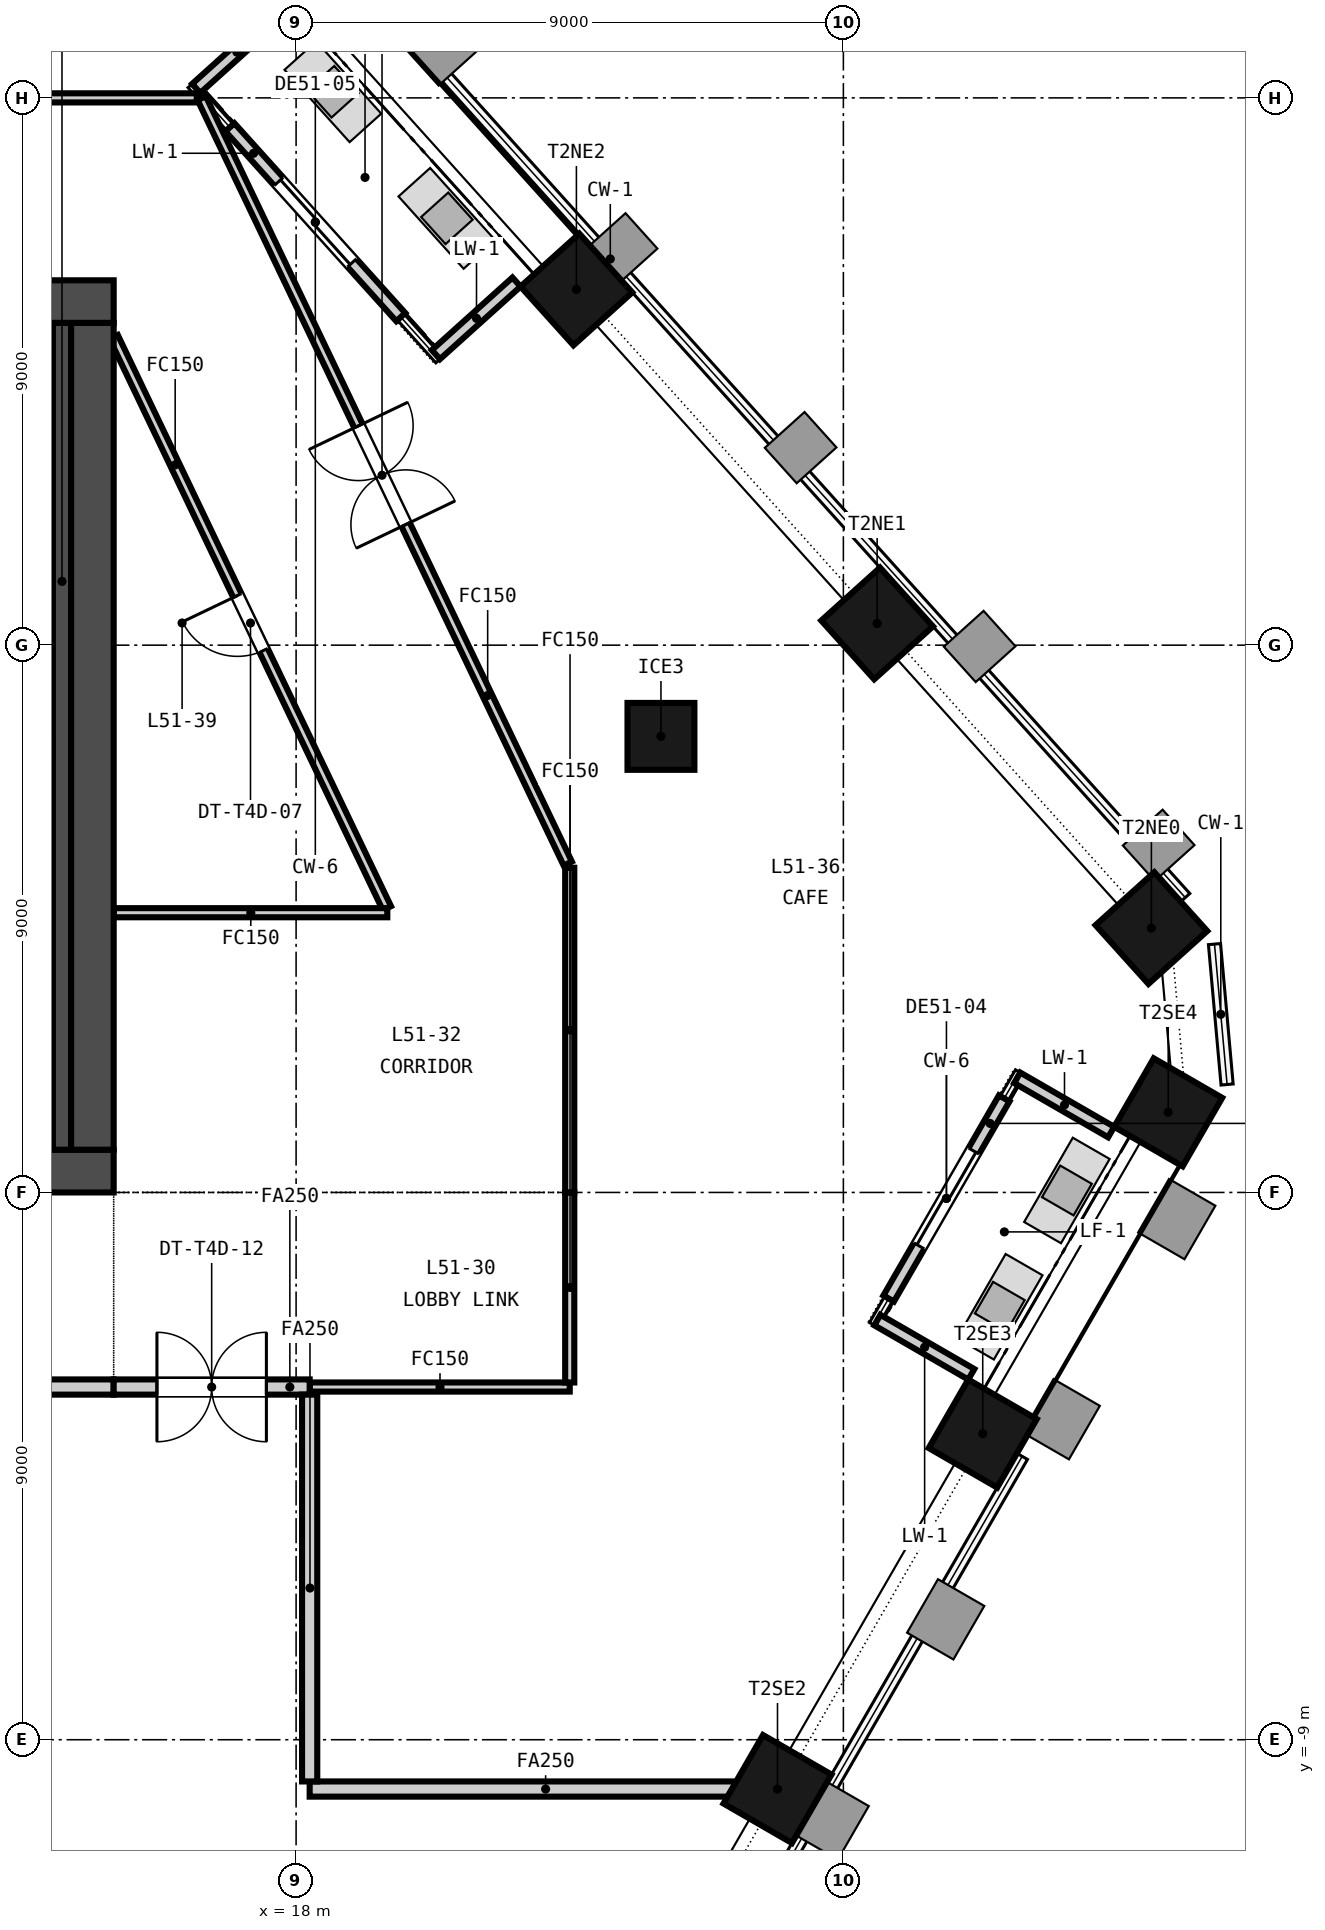
"""IFC4 building model, lengths in metres.
Left out: names, types, materials, properties, quantities, classifications, styles, units other than length and angle.
Written with IfcOpenShell. Run it as: python <this file> out.ifc"""

import sys

from ifc_helpers import new_model, si_unit, direction, frame, frame_2d, origin, origin_2d, place, context, subcontext, project, spatial, rectangle, extrude, element, fill, save


model = new_model("IFC4")
c1 = context("Model", 3, precision=1e-05, world=origin(), true_north=direction((0.0, 1.0)))
c2 = subcontext(c1, "Body", "Model", "MODEL_VIEW")
j1 = project(units=[si_unit("LENGTHUNIT", "METRE"), si_unit("PLANEANGLEUNIT", "RADIAN")], contexts=[c1])
p1 = place(None, origin())
s1 = spatial("IfcSite", under=j1, at=p1, CompositionType="ELEMENT")
p2 = place(p1, origin())
s2 = spatial("IfcBuilding", under=s1, at=p2, CompositionType="ELEMENT")
p3 = place(p2, frame((0.0, 0.0, 203.65)))
s3 = spatial("IfcBuildingStorey", under=s2, at=p3, CompositionType="ELEMENT", Elevation=203.65)
p4 = place(p3, frame((-15.0, 0.35, -0.15), z_axis=(0.0, 0.0, 1.0), x_axis=(1.0, 0.0, 0.0)))
e1 = element("IfcWall", 1, at=p4, inside=s3, PredefinedType="SOLIDWALL", context=c2, shape_type="SweptSolid", body=[
    extrude(rectangle(XDim=30.0, YDim=0.7, at=frame_2d((15.0, 0.0))), origin(), (0.0, 0.0, 1.0), 3.5),
])
p5 = place(p4, frame((5.8, 0.0, 0.15)))
e2 = element("IfcOpeningElement", 2, at=p5, cuts=e1, PredefinedType="OPENING", context=c2, shape_type="SweptSolid", body=[
    extrude(rectangle(XDim=2.4, YDim=2.4, at=frame_2d((1.2, 1.2))), frame((0.0, 0.36, 0.0), z_axis=(0.0, -1.0, 0.0), x_axis=(1.0, 0.0, 0.0)), (0.0, 0.0, 1.0), 0.72),
])
p6 = place(p4, frame((13.8, 0.0, 0.15)))
e3 = element("IfcOpeningElement", 3, at=p6, cuts=e1, PredefinedType="OPENING", context=c2, shape_type="SweptSolid", body=[
    extrude(rectangle(XDim=2.4, YDim=2.4, at=frame_2d((1.2, 1.2))), frame((0.0, 0.36, 0.0), z_axis=(0.0, -1.0, 0.0), x_axis=(1.0, 0.0, 0.0)), (0.0, 0.0, 1.0), 0.72),
])
p7 = place(p4, frame((21.8, 0.0, 0.15)))
e4 = element("IfcOpeningElement", 4, at=p7, cuts=e1, PredefinedType="OPENING", context=c2, shape_type="SweptSolid", body=[
    extrude(rectangle(XDim=2.4, YDim=2.4, at=frame_2d((1.2, 1.2))), frame((0.0, 0.36, 0.0), z_axis=(0.0, -1.0, 0.0), x_axis=(1.0, 0.0, 0.0)), (0.0, 0.0, 1.0), 0.72),
])
p8 = place(p4, frame((1.5, 0.0, 0.15)))
e5 = element("IfcOpeningElement", 5, at=p8, cuts=e1, PredefinedType="OPENING", context=c2, shape_type="SweptSolid", body=[
    extrude(rectangle(XDim=1.2, YDim=2.1, at=frame_2d((0.6, 1.05))), frame((0.0, 0.36, 0.0), z_axis=(0.0, -1.0, 0.0), x_axis=(1.0, 0.0, 0.0)), (0.0, 0.0, 1.0), 0.72),
])
p9 = place(p4, frame((27.3, 0.0, 0.15)))
e6 = element("IfcOpeningElement", 6, at=p9, cuts=e1, PredefinedType="OPENING", context=c2, shape_type="SweptSolid", body=[
    extrude(rectangle(XDim=1.2, YDim=2.1, at=frame_2d((0.6, 1.05))), frame((0.0, 0.36, 0.0), z_axis=(0.0, -1.0, 0.0), x_axis=(1.0, 0.0, 0.0)), (0.0, 0.0, 1.0), 0.72),
])
p10 = place(p3, frame((-15.0, 14.65, -0.15), z_axis=(0.0, 0.0, 1.0), x_axis=(1.0, 0.0, 0.0)))
e7 = element("IfcWall", 7, at=p10, inside=s3, PredefinedType="SOLIDWALL", context=c2, shape_type="SweptSolid", body=[
    extrude(rectangle(XDim=30.0, YDim=0.7, at=frame_2d((15.0, 0.0))), origin(), (0.0, 0.0, 1.0), 3.5),
])
p11 = place(p10, frame((9.25, 0.0, 0.15)))
e8 = element("IfcOpeningElement", 8, at=p11, cuts=e7, PredefinedType="OPENING", context=c2, shape_type="SweptSolid", body=[
    extrude(rectangle(XDim=1.5, YDim=2.1, at=frame_2d((0.75, 1.05))), frame((0.0, 0.36, 0.0), z_axis=(0.0, -1.0, 0.0), x_axis=(1.0, 0.0, 0.0)), (0.0, 0.0, 1.0), 0.72),
])
p12 = place(p10, frame((19.4, 0.0, 0.15)))
e9 = element("IfcOpeningElement", 9, at=p12, cuts=e7, PredefinedType="OPENING", context=c2, shape_type="SweptSolid", body=[
    extrude(rectangle(XDim=1.5, YDim=2.1, at=frame_2d((0.75, 1.05))), frame((0.0, 0.36, 0.0), z_axis=(0.0, -1.0, 0.0), x_axis=(1.0, 0.0, 0.0)), (0.0, 0.0, 1.0), 0.72),
])
p13 = place(p10, frame((1.5, 0.0, 0.15)))
e10 = element("IfcOpeningElement", 10, at=p13, cuts=e7, PredefinedType="OPENING", context=c2, shape_type="SweptSolid", body=[
    extrude(rectangle(XDim=1.2, YDim=2.1, at=frame_2d((0.6, 1.05))), frame((0.0, 0.36, 0.0), z_axis=(0.0, -1.0, 0.0), x_axis=(1.0, 0.0, 0.0)), (0.0, 0.0, 1.0), 0.72),
])
p14 = place(p10, frame((27.3, 0.0, 0.15)))
e11 = element("IfcOpeningElement", 11, at=p14, cuts=e7, PredefinedType="OPENING", context=c2, shape_type="SweptSolid", body=[
    extrude(rectangle(XDim=1.2, YDim=2.1, at=frame_2d((0.6, 1.05))), frame((0.0, 0.36, 0.0), z_axis=(0.0, -1.0, 0.0), x_axis=(1.0, 0.0, 0.0)), (0.0, 0.0, 1.0), 0.72),
])
p15 = place(p3, frame((14.65, 0.7, -0.15), z_axis=(0.0, 0.0, 1.0), x_axis=(0.0, 1.0, 0.0)))
e12 = element("IfcWall", 12, at=p15, inside=s3, PredefinedType="SOLIDWALL", context=c2, shape_type="SweptSolid", body=[
    extrude(rectangle(XDim=13.6, YDim=0.7, at=frame_2d((6.8, 0.0))), origin(), (0.0, 0.0, 1.0), 3.5),
])
for number, where, z_axis, x_axis in (
    (13, (25.917, -9.811, -0.15), (0.0, 0.0, 1.0), (0.5, 0.866, 0.0)),
    (14, (29.292, -3.965, -0.15), (0.0, 0.0, 1.0), (0.5, 0.866, 0.0)),
    (15, (32.342, 1.318, -0.15), (0.0, 0.0, 1.0), (0.5, 0.866, 0.0)),
    (16, (32.065, 4.347, -0.15), (0.0, 0.0, 1.0), (-0.669, 0.743, 0.0)),
    (17, (27.555, 9.357, -0.15), (0.0, 0.0, 1.0), (-0.669, 0.743, 0.0)),
    (18, (22.61, 14.849, -0.15), (0.0, 0.0, 1.0), (-0.669, 0.743, 0.0)),
):
    element("IfcColumn", number, at=place(p3, frame(where, z_axis=z_axis, x_axis=x_axis)), inside=s3, PredefinedType="COLUMN", context=c2, shape_type="SweptSolid", body=[
        extrude(rectangle(XDim=1.3, YDim=1.3, at=origin_2d()), origin(), (0.0, 0.0, 1.0), 3.5),
    ])
p16 = place(p3, frame((24.0, 7.5, -0.15), z_axis=(0.0, 0.0, 1.0), x_axis=(1.0, 0.0, 0.0)))
e19 = element("IfcColumn", 19, at=p16, inside=s3, PredefinedType="COLUMN", context=c2, shape_type="SweptSolid", body=[
    extrude(rectangle(XDim=1.1, YDim=1.1, at=origin_2d()), origin(), (0.0, 0.0, 1.0), 3.5),
])
p17 = place(p3, frame((27.745, -1.744, 0.0), z_axis=(0.0, 0.0, 1.0), x_axis=(0.500015340139, 0.86601654697, 0.0)))
e20 = element("IfcWall", 20, at=p17, inside=s3, PredefinedType="SOLIDWALL", context=c2, shape_type="SweptSolid", body=[
    extrude(rectangle(XDim=3.8, YDim=0.2, at=frame_2d((1.9, 0.0))), origin(), (0.0, 0.0, 1.0), 2.75),
])
p18 = place(p17, frame((1.0, 0.0, 0.0)))
e21 = element("IfcOpeningElement", 21, at=p18, cuts=e20, PredefinedType="OPENING", context=c2, shape_type="SweptSolid", body=[
    extrude(rectangle(XDim=1.8, YDim=2.4, at=frame_2d((0.9, 1.2))), frame((0.0, 0.11, 0.0), z_axis=(0.0, -1.0, 0.0), x_axis=(1.0, 0.0, 0.0)), (0.0, 0.0, 1.0), 0.22),
])
for number, where, z_axis, x_axis in (
    (22, (29.104, -2.991, 0.0), (0.0, 0.0, 1.0), (-0.866, 0.5, 0.0)),
    (23, (31.404, 0.993, 0.0), (0.0, 0.0, 1.0), (-0.866, 0.5, 0.0)),
):
    element("IfcWall", number, at=place(p3, frame(where, z_axis=z_axis, x_axis=x_axis)), inside=s3, PredefinedType="SOLIDWALL", context=c2, shape_type="SweptSolid", body=[
        extrude(rectangle(XDim=1.784, YDim=0.2, at=frame_2d((0.892, 0.0))), origin(), (0.0, 0.0, 1.0), 2.9),
    ])
p19 = place(p3, frame((19.721, 14.395, 0.0), z_axis=(0.0, 0.0, 1.0), x_axis=(-0.669170241733, 0.743109135712, 0.0)))
e24 = element("IfcWall", 24, at=p19, inside=s3, PredefinedType="SOLIDWALL", context=c2, shape_type="SweptSolid", body=[
    extrude(rectangle(XDim=4.2, YDim=0.2, at=frame_2d((2.1, 0.0))), origin(), (0.0, 0.0, 1.0), 2.747),
])
p20 = place(p19, frame((1.2, 0.0, 0.0)))
e25 = element("IfcOpeningElement", 25, at=p20, cuts=e24, PredefinedType="OPENING", context=c2, shape_type="SweptSolid", body=[
    extrude(rectangle(XDim=1.8, YDim=2.4, at=frame_2d((0.9, 1.2))), frame((0.0, 0.11, 0.0), z_axis=(0.0, -1.0, 0.0), x_axis=(1.0, 0.0, 0.0)), (0.0, 0.0, 1.0), 0.22),
])
p21 = place(p3, frame((21.625, 14.971, 0.0), z_axis=(0.0, 0.0, 1.0), x_axis=(-0.743219291252, -0.669047894482, 0.0)))
e26 = element("IfcWall", 26, at=p21, inside=s3, PredefinedType="SOLIDWALL", context=c2, shape_type="SweptSolid", body=[
    extrude(rectangle(XDim=1.784, YDim=0.2, at=frame_2d((0.892, 0.0))), origin(), (0.0, 0.0, 1.0), 2.747),
])
p22 = place(p3, frame((17.683, 19.349, 0.0), z_axis=(0.0, 0.0, 1.0), x_axis=(-0.743158025489, -0.66911594597, 0.0)))
e27 = element("IfcWall", 27, at=p22, inside=s3, PredefinedType="SOLIDWALL", context=c2, shape_type="SweptSolid", body=[
    extrude(rectangle(XDim=1.784, YDim=0.2, at=frame_2d((0.892, 0.0))), origin(), (0.0, 0.0, 1.0), 2.9),
])
p23 = place(p3, frame((11.05, 7.35, 0.0), z_axis=(0.0, 0.0, 1.0), x_axis=(1.0, 0.0, 0.0)))
e28 = element("IfcWall", 28, at=p23, inside=s3, PredefinedType="SOLIDWALL", context=c2, shape_type="SweptSolid", body=[
    extrude(rectangle(XDim=2.95, YDim=0.3, at=frame_2d((1.475, 0.0))), origin(), (0.0, 0.0, 1.0), 3.35),
])
p24 = place(p3, frame((14.15, 0.7, 0.0), z_axis=(0.0, 0.0, 1.0), x_axis=(0.0, 1.0, 0.0)))
e29 = element("IfcWall", 29, at=p24, inside=s3, PredefinedType="SOLIDWALL", context=c2, shape_type="SweptSolid", body=[
    extrude(rectangle(XDim=13.6, YDim=0.3, at=frame_2d((6.8, 0.0))), origin(), (0.0, 0.0, 1.0), 3.35),
])
p25 = place(p3, frame((15.0, -3.2, 0.0), z_axis=(0.0, 0.0, 1.0), x_axis=(-1.0, 0.0, 0.0)))
e30 = element("IfcWall", 30, at=p25, inside=s3, PredefinedType="PARTITIONING", context=c2, shape_type="SweptSolid", body=[
    extrude(rectangle(XDim=7.355, YDim=0.25, at=frame_2d((3.677, 0.0))), origin(), (0.0, 0.0, 1.0), 2.591),
])
p26 = place(p25, frame((2.778, 0.0, 0.0)))
e31 = element("IfcOpeningElement", 31, at=p26, cuts=e30, PredefinedType="OPENING", context=c2, shape_type="SweptSolid", body=[
    extrude(rectangle(XDim=1.8, YDim=2.1, at=frame_2d((0.9, 1.05))), frame((0.0, 0.135, 0.0), z_axis=(0.0, -1.0, 0.0), x_axis=(1.0, 0.0, 0.0)), (0.0, 0.0, 1.0), 0.27),
])
p27 = place(p3, frame((22.5, -3.2, 0.0), z_axis=(0.0, 0.0, 1.0), x_axis=(-1.0, 0.0, 0.0)))
e32 = element("IfcWall", 32, at=p27, inside=s3, PredefinedType="PARTITIONING", context=c2, shape_type="SweptSolid", body=[
    extrude(rectangle(XDim=4.277, YDim=0.15, at=frame_2d((2.139, 0.0))), origin(), (0.0, 0.0, 1.0), 2.591),
])
p28 = place(p3, frame((22.5, 0.0, 0.0), z_axis=(0.0, 0.0, 1.0), x_axis=(0.0, -1.0, 0.0)))
e33 = element("IfcWall", 33, at=p28, inside=s3, PredefinedType="PARTITIONING", context=c2, shape_type="SweptSolid", body=[
    extrude(rectangle(XDim=3.125, YDim=0.15, at=frame_2d((1.562, 0.0))), origin(), (0.0, 0.0, 1.0), 2.591),
])
p29 = place(p3, frame((18.223, -3.2, 0.0), z_axis=(0.0, 0.0, 1.0), x_axis=(-1.0, 0.0, 0.0)))
e34 = element("IfcWall", 34, at=p29, inside=s3, PredefinedType="PARTITIONING", context=c2, shape_type="SweptSolid", body=[
    extrude(rectangle(XDim=3.223, YDim=0.25, at=frame_2d((1.611, 0.0))), origin(), (0.0, 0.0, 1.0), 2.591),
])
p30 = place(p29, frame((0.711, 0.0, 0.0)))
e35 = element("IfcOpeningElement", 35, at=p30, cuts=e34, PredefinedType="OPENING", context=c2, shape_type="SweptSolid", body=[
    extrude(rectangle(XDim=1.8, YDim=2.1, at=frame_2d((0.9, 1.05))), frame((0.0, 0.135, 0.0), z_axis=(0.0, -1.0, 0.0), x_axis=(1.0, 0.0, 0.0)), (0.0, 0.0, 1.0), 0.27),
])
p31 = place(p3, frame((22.5, 5.34, 0.0), z_axis=(0.0, 0.0, 1.0), x_axis=(0.0, -1.0, 0.0)))
e36 = element("IfcWall", 36, at=p31, inside=s3, PredefinedType="PARTITIONING", context=c2, shape_type="SweptSolid", body=[
    extrude(rectangle(XDim=5.34, YDim=0.15, at=frame_2d((2.67, 0.0))), origin(), (0.0, 0.0, 1.0), 2.591),
])
p32 = place(p3, frame((19.493, 4.675, 0.0), z_axis=(0.0, 0.0, 1.0), x_axis=(-0.43146462293, 0.902129857149, 0.0)))
e37 = element("IfcWall", 37, at=p32, inside=s3, PredefinedType="PARTITIONING", context=c2, shape_type="SweptSolid", body=[
    extrude(rectangle(XDim=10.413, YDim=0.15, at=frame_2d((5.207, 0.0))), origin(), (0.0, 0.0, 1.0), 2.591),
])
p33 = place(p32, frame((4.698, 0.0, 0.0)))
e38 = element("IfcOpeningElement", 38, at=p33, cuts=e37, PredefinedType="OPENING", context=c2, shape_type="SweptSolid", body=[
    extrude(rectangle(XDim=1.0, YDim=2.1, at=frame_2d((0.5, 1.05))), frame((0.0, 0.085, 0.0), z_axis=(0.0, -1.0, 0.0), x_axis=(1.0, 0.0, 0.0)), (0.0, 0.0, 1.0), 0.17),
])
p34 = place(p3, frame((2.338, 18.0, 0.0), z_axis=(0.0, 0.0, 1.0), x_axis=(1.0, 0.0, 0.0)))
e39 = element("IfcWall", 39, at=p34, inside=s3, PredefinedType="PARTITIONING", context=c2, shape_type="SweptSolid", body=[
    extrude(rectangle(XDim=14.03, YDim=0.15, at=frame_2d((7.015, 0.0))), origin(), (0.0, 0.0, 1.0), 2.591),
])
p35 = place(p34, frame((6.154, 0.0, 0.0)))
e40 = element("IfcOpeningElement", 40, at=p35, cuts=e39, PredefinedType="OPENING", context=c2, shape_type="SweptSolid", body=[
    extrude(rectangle(XDim=1.8, YDim=2.1, at=frame_2d((0.9, 1.05))), frame((0.0, 0.085, 0.0), z_axis=(0.0, -1.0, 0.0), x_axis=(1.0, 0.0, 0.0)), (0.0, 0.0, 1.0), 0.17),
])
p36 = place(p3, frame((16.448, 17.994, 0.0), z_axis=(0.0, 0.0, 1.0), x_axis=(0.431473453182, -0.902125633822, 0.0)))
e41 = element("IfcWall", 41, at=p36, inside=s3, PredefinedType="PARTITIONING", context=c2, shape_type="SweptSolid", body=[
    extrude(rectangle(XDim=13.952, YDim=0.15, at=frame_2d((6.976, 0.0))), origin(), (0.0, 0.0, 1.0), 2.591),
])
p37 = place(p36, frame((5.973, 0.0, 0.0)))
e42 = element("IfcOpeningElement", 42, at=p37, cuts=e41, PredefinedType="OPENING", context=c2, shape_type="SweptSolid", body=[
    extrude(rectangle(XDim=1.8, YDim=2.1, at=frame_2d((0.9, 1.05))), frame((0.0, 0.085, 0.0), z_axis=(0.0, -1.0, 0.0), x_axis=(1.0, 0.0, 0.0)), (0.0, 0.0, 1.0), 0.17),
])
p38 = place(p3, frame((18.223, -9.811, 0.0), z_axis=(0.0, 0.0, 1.0), x_axis=(1.0, 0.0, 0.0)))
e43 = element("IfcWall", 43, at=p38, inside=s3, PredefinedType="PARTITIONING", context=c2, shape_type="SweptSolid", body=[
    extrude(rectangle(XDim=7.751, YDim=0.25, at=frame_2d((3.875, 0.0))), origin(), (0.0, 0.0, 1.0), 2.591),
])
p39 = place(p3, frame((15.0, 4.6, 0.0), z_axis=(0.0, 0.0, 1.0), x_axis=(1.0, 0.0, 0.0)))
e44 = element("IfcWall", 44, at=p39, inside=s3, PredefinedType="PARTITIONING", context=c2, shape_type="SweptSolid", body=[
    extrude(rectangle(XDim=4.5, YDim=0.15, at=frame_2d((2.25, 0.0))), origin(), (0.0, 0.0, 1.0), 2.591),
])
p40 = place(p3, frame((18.223, -9.686, 0.0), z_axis=(0.0, 0.0, 1.0), x_axis=(0.0, 1.0, 0.0)))
e45 = element("IfcWall", 45, at=p40, inside=s3, PredefinedType="PARTITIONING", context=c2, shape_type="SweptSolid", body=[
    extrude(rectangle(XDim=6.361, YDim=0.25, at=frame_2d((3.181, 0.0))), origin(), (0.0, 0.0, 1.0), 2.591),
])
p41 = place(p18, origin())
e46 = element("IfcDoor", 46, at=p41, inside=s3, OperationType="SINGLE_SWING_LEFT", PredefinedType="DOOR", context=c2, shape_type="SweptSolid", body=[
    extrude(rectangle(XDim=1.8, YDim=2.4, at=frame_2d((0.9, 1.2))), frame((0.0, 0.025, 0.0), z_axis=(0.0, -1.0, 0.0), x_axis=(1.0, 0.0, 0.0)), (0.0, 0.0, 1.0), 0.05),
])
fill(e21, e46)
p42 = place(p20, origin())
e47 = element("IfcDoor", 47, at=p42, inside=s3, OperationType="SINGLE_SWING_LEFT", PredefinedType="DOOR", context=c2, shape_type="SweptSolid", body=[
    extrude(rectangle(XDim=1.8, YDim=2.4, at=frame_2d((0.9, 1.2))), frame((0.0, 0.025, 0.0), z_axis=(0.0, -1.0, 0.0), x_axis=(1.0, 0.0, 0.0)), (0.0, 0.0, 1.0), 0.05),
])
fill(e25, e47)
p43 = place(p37, origin())
e48 = element("IfcDoor", 48, at=p43, inside=s3, OperationType="DOUBLE_DOOR_DOUBLE_SWING", PredefinedType="DOOR", context=c2, shape_type="SweptSolid", body=[
    extrude(rectangle(XDim=1.8, YDim=2.1, at=frame_2d((0.9, 1.05))), frame((0.0, 0.025, 0.0), z_axis=(0.0, -1.0, 0.0), x_axis=(1.0, 0.0, 0.0)), (0.0, 0.0, 1.0), 0.05),
])
fill(e42, e48)
p44 = place(p33, origin())
e49 = element("IfcDoor", 49, at=p44, inside=s3, OperationType="SINGLE_SWING_RIGHT", PredefinedType="DOOR", context=c2, shape_type="SweptSolid", body=[
    extrude(rectangle(XDim=1.0, YDim=2.1, at=frame_2d((0.5, 1.05))), frame((0.0, 0.025, 0.0), z_axis=(0.0, -1.0, 0.0), x_axis=(1.0, 0.0, 0.0)), (0.0, 0.0, 1.0), 0.05),
])
fill(e38, e49)
p45 = place(p30, origin())
e50 = element("IfcDoor", 50, at=p45, inside=s3, OperationType="DOUBLE_DOOR_DOUBLE_SWING", PredefinedType="DOOR", context=c2, shape_type="SweptSolid", body=[
    extrude(rectangle(XDim=1.8, YDim=2.1, at=frame_2d((0.9, 1.05))), frame((0.0, 0.025, 0.0), z_axis=(0.0, -1.0, 0.0), x_axis=(1.0, 0.0, 0.0)), (0.0, 0.0, 1.0), 0.05),
])
fill(e35, e50)
save(model, sys.argv[1])
